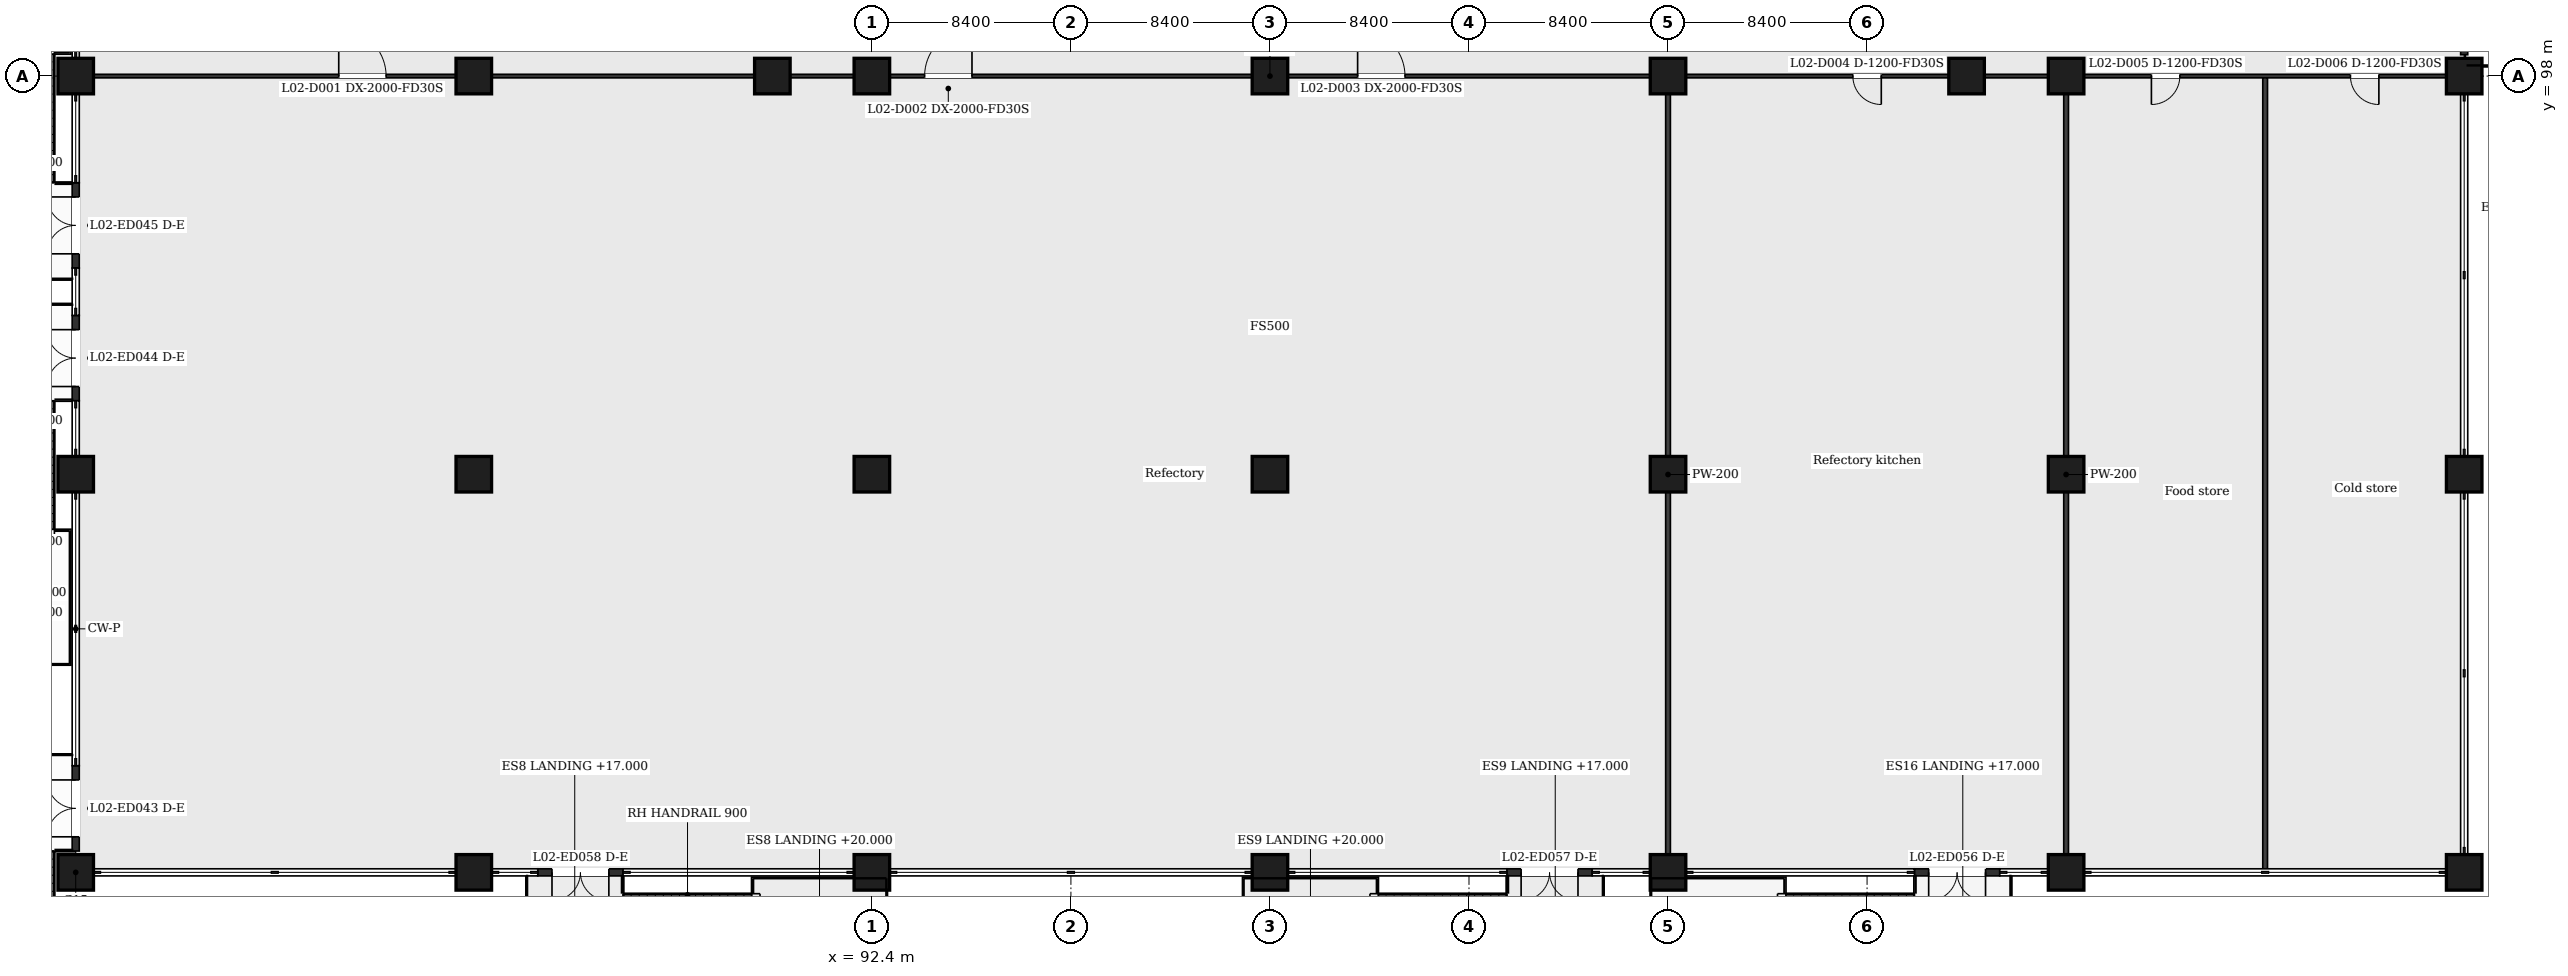
"""IFC4 building model, lengths in metres.
Left out: names, types, materials, properties, quantities, classifications, styles, units other than length and angle.
Written with IfcOpenShell. Run it as: python <this file> out.ifc"""

import sys

from ifc_helpers import new_model, si_unit, direction, frame, frame_2d, origin, origin_2d, place, context, subcontext, project, spatial, rectangle, extrude, element, fill, save


model = new_model("IFC4")
c1 = context("Model", 3, precision=1e-05, world=origin(), true_north=direction((0.0, 1.0)))
c2 = subcontext(c1, "Body", "Model", "MODEL_VIEW")
j1 = project(units=[si_unit("LENGTHUNIT", "METRE"), si_unit("PLANEANGLEUNIT", "RADIAN")], contexts=[c1])
p1 = place(None, origin())
s1 = spatial("IfcSite", under=j1, at=p1, CompositionType="ELEMENT")
p2 = place(p1, origin())
s2 = spatial("IfcBuilding", under=s1, at=p2, CompositionType="ELEMENT")
p3 = place(p2, frame((0.0, 0.0, 17.0)))
s3 = spatial("IfcBuildingStorey", under=s2, at=p3, CompositionType="ELEMENT", Elevation=17.0)
for number, where, z_axis, x_axis in (
    (1, (58.8, 64.4, 0.0), (0.0, 0.0, 1.0), (1.0, 0.0, 0.0)),
    (2, (75.6, 64.4, 0.0), (0.0, 0.0, 1.0), (1.0, 0.0, 0.0)),
    (3, (92.4, 64.4, 0.0), (0.0, 0.0, 1.0), (1.0, 0.0, 0.0)),
    (4, (109.2, 64.4, 0.0), (0.0, 0.0, 1.0), (1.0, 0.0, 0.0)),
    (5, (126.0, 64.4, 0.0), (0.0, 0.0, 1.0), (1.0, 0.0, 0.0)),
    (6, (142.8, 64.4, 0.0), (0.0, 0.0, 1.0), (1.0, 0.0, 0.0)),
    (7, (159.6, 64.4, 0.0), (0.0, 0.0, 1.0), (1.0, 0.0, 0.0)),
    (8, (58.8, 81.2, 0.0), (0.0, 0.0, 1.0), (1.0, 0.0, 0.0)),
    (9, (75.6, 81.2, 0.0), (0.0, 0.0, 1.0), (1.0, 0.0, 0.0)),
    (10, (92.4, 81.2, 0.0), (0.0, 0.0, 1.0), (1.0, 0.0, 0.0)),
    (11, (109.2, 81.2, 0.0), (0.0, 0.0, 1.0), (1.0, 0.0, 0.0)),
    (12, (126.0, 81.2, 0.0), (0.0, 0.0, 1.0), (1.0, 0.0, 0.0)),
    (13, (142.8, 81.2, 0.0), (0.0, 0.0, 1.0), (1.0, 0.0, 0.0)),
    (14, (159.6, 81.2, 0.0), (0.0, 0.0, 1.0), (1.0, 0.0, 0.0)),
    (15, (58.8, 98.0, 0.0), (0.0, 0.0, 1.0), (1.0, 0.0, 0.0)),
    (16, (75.6, 98.0, 0.0), (0.0, 0.0, 1.0), (1.0, 0.0, 0.0)),
    (17, (88.2, 98.0, 0.0), (0.0, 0.0, 1.0), (1.0, 0.0, 0.0)),
    (18, (92.4, 98.0, 0.0), (0.0, 0.0, 1.0), (1.0, 0.0, 0.0)),
    (19, (109.2, 98.0, 0.0), (0.0, 0.0, 1.0), (1.0, 0.0, 0.0)),
    (20, (126.0, 98.0, 0.0), (0.0, 0.0, 1.0), (1.0, 0.0, 0.0)),
    (21, (138.6, 98.0, 0.0), (0.0, 0.0, 1.0), (1.0, 0.0, 0.0)),
    (22, (142.8, 98.0, 0.0), (0.0, 0.0, 1.0), (1.0, 0.0, 0.0)),
    (23, (159.6, 98.0, 0.0), (0.0, 0.0, 1.0), (1.0, 0.0, 0.0)),
):
    element("IfcColumn", number, at=place(p3, frame(where, z_axis=z_axis, x_axis=x_axis)), inside=s3, PredefinedType="COLUMN", context=c2, shape_type="SweptSolid", body=[
        extrude(rectangle(XDim=1.5, YDim=1.5, at=origin_2d()), origin(), (0.0, 0.0, 1.0), 6.0),
    ])
p4 = place(p3, frame((58.8, 65.3, 0.0), z_axis=(0.0, 0.0, 1.0), x_axis=(0.0, 1.0, 0.0)))
e24 = element("IfcWall", 24, at=p4, inside=s3, PredefinedType="SOLIDWALL", context=c2, shape_type="SweptSolid", body=[
    extrude(rectangle(XDim=3.6, YDim=0.3, at=frame_2d((1.8, 0.0))), origin(), (0.0, 0.0, 1.0), 5.1),
])
p5 = place(p4, frame((0.6, 0.0, 0.0)))
e25 = element("IfcOpeningElement", 25, at=p5, cuts=e24, PredefinedType="OPENING", context=c2, shape_type="SweptSolid", body=[
    extrude(rectangle(XDim=2.4, YDim=2.4, at=frame_2d((1.2, 1.2))), frame((0.0, 0.16, 0.0), z_axis=(0.0, -1.0, 0.0), x_axis=(1.0, 0.0, 0.0)), (0.0, 0.0, 1.0), 0.32),
])
p6 = place(p3, frame((58.8, 84.3, 0.0), z_axis=(0.0, 0.0, 1.0), x_axis=(0.0, 1.0, 0.0)))
e26 = element("IfcWall", 26, at=p6, inside=s3, PredefinedType="SOLIDWALL", context=c2, shape_type="SweptSolid", body=[
    extrude(rectangle(XDim=3.6, YDim=0.3, at=frame_2d((1.8, 0.0))), origin(), (0.0, 0.0, 1.0), 5.1),
])
p7 = place(p6, frame((0.6, 0.0, 0.0)))
e27 = element("IfcOpeningElement", 27, at=p7, cuts=e26, PredefinedType="OPENING", context=c2, shape_type="SweptSolid", body=[
    extrude(rectangle(XDim=2.4, YDim=2.4, at=frame_2d((1.2, 1.2))), frame((0.0, 0.16, 0.0), z_axis=(0.0, -1.0, 0.0), x_axis=(1.0, 0.0, 0.0)), (0.0, 0.0, 1.0), 0.32),
])
p8 = place(p3, frame((58.8, 89.9, 0.0), z_axis=(0.0, 0.0, 1.0), x_axis=(0.0, 1.0, 0.0)))
e28 = element("IfcWall", 28, at=p8, inside=s3, PredefinedType="SOLIDWALL", context=c2, shape_type="SweptSolid", body=[
    extrude(rectangle(XDim=3.6, YDim=0.3, at=frame_2d((1.8, 0.0))), origin(), (0.0, 0.0, 1.0), 5.1),
])
p9 = place(p8, frame((0.6, 0.0, 0.0)))
e29 = element("IfcOpeningElement", 29, at=p9, cuts=e28, PredefinedType="OPENING", context=c2, shape_type="SweptSolid", body=[
    extrude(rectangle(XDim=2.4, YDim=2.4, at=frame_2d((1.2, 1.2))), frame((0.0, 0.16, 0.0), z_axis=(0.0, -1.0, 0.0), x_axis=(1.0, 0.0, 0.0)), (0.0, 0.0, 1.0), 0.32),
])
p10 = place(p3, frame((159.6, 102.5, 0.0), z_axis=(0.0, 0.0, 1.0), x_axis=(0.0, -1.0, 0.0)))
e30 = element("IfcWall", 30, at=p10, inside=s3, PredefinedType="SOLIDWALL", context=c2, shape_type="SweptSolid", body=[
    extrude(rectangle(XDim=3.6, YDim=0.3, at=frame_2d((1.8, 0.0))), origin(), (0.0, 0.0, 1.0), 5.1),
])
p11 = place(p10, frame((0.6, 0.0, 0.0)))
e31 = element("IfcOpeningElement", 31, at=p11, cuts=e30, PredefinedType="OPENING", context=c2, shape_type="SweptSolid", body=[
    extrude(rectangle(XDim=2.4, YDim=2.4, at=frame_2d((1.2, 1.2))), frame((0.0, 0.16, 0.0), z_axis=(0.0, -1.0, 0.0), x_axis=(1.0, 0.0, 0.0)), (0.0, 0.0, 1.0), 0.32),
])
p12 = place(p3, frame((140.0, 64.4, 0.0), z_axis=(0.0, 0.0, 1.0), x_axis=(-1.0, 0.0, 0.0)))
e32 = element("IfcWall", 32, at=p12, inside=s3, PredefinedType="SOLIDWALL", context=c2, shape_type="SweptSolid", body=[
    extrude(rectangle(XDim=3.6, YDim=0.3, at=frame_2d((1.8, 0.0))), origin(), (0.0, 0.0, 1.0), 5.1),
])
p13 = place(p12, frame((0.6, 0.0, 0.0)))
e33 = element("IfcOpeningElement", 33, at=p13, cuts=e32, PredefinedType="OPENING", context=c2, shape_type="SweptSolid", body=[
    extrude(rectangle(XDim=2.4, YDim=2.4, at=frame_2d((1.2, 1.2))), frame((0.0, 0.16, 0.0), z_axis=(0.0, -1.0, 0.0), x_axis=(1.0, 0.0, 0.0)), (0.0, 0.0, 1.0), 0.32),
])
p14 = place(p3, frame((122.8, 64.4, 0.0), z_axis=(0.0, 0.0, 1.0), x_axis=(-1.0, 0.0, 0.0)))
e34 = element("IfcWall", 34, at=p14, inside=s3, PredefinedType="SOLIDWALL", context=c2, shape_type="SweptSolid", body=[
    extrude(rectangle(XDim=3.6, YDim=0.3, at=frame_2d((1.8, 0.0))), origin(), (0.0, 0.0, 1.0), 5.1),
])
p15 = place(p14, frame((0.6, 0.0, 0.0)))
e35 = element("IfcOpeningElement", 35, at=p15, cuts=e34, PredefinedType="OPENING", context=c2, shape_type="SweptSolid", body=[
    extrude(rectangle(XDim=2.4, YDim=2.4, at=frame_2d((1.2, 1.2))), frame((0.0, 0.16, 0.0), z_axis=(0.0, -1.0, 0.0), x_axis=(1.0, 0.0, 0.0)), (0.0, 0.0, 1.0), 0.32),
])
p16 = place(p3, frame((81.9, 64.4, 0.0), z_axis=(0.0, 0.0, 1.0), x_axis=(-1.0, 0.0, 0.0)))
e36 = element("IfcWall", 36, at=p16, inside=s3, PredefinedType="SOLIDWALL", context=c2, shape_type="SweptSolid", body=[
    extrude(rectangle(XDim=3.6, YDim=0.3, at=frame_2d((1.8, 0.0))), origin(), (0.0, 0.0, 1.0), 5.1),
])
p17 = place(p16, frame((0.6, 0.0, 0.0)))
e37 = element("IfcOpeningElement", 37, at=p17, cuts=e36, PredefinedType="OPENING", context=c2, shape_type="SweptSolid", body=[
    extrude(rectangle(XDim=2.4, YDim=2.4, at=frame_2d((1.2, 1.2))), frame((0.0, 0.16, 0.0), z_axis=(0.0, -1.0, 0.0), x_axis=(1.0, 0.0, 0.0)), (0.0, 0.0, 1.0), 0.32),
])
p18 = place(p3, frame((58.85, 98.0, 0.0), z_axis=(0.0, 0.0, 1.0), x_axis=(1.0, 0.0, 0.0)))
e38 = element("IfcWall", 38, at=p18, inside=s3, PredefinedType="PARTITIONING", context=c2, shape_type="SweptSolid", body=[
    extrude(rectangle(XDim=100.7, YDim=0.15, at=frame_2d((50.35, 0.0))), origin(), (0.0, 0.0, 1.0), 5.5),
])
p19 = place(p18, frame((11.05, 0.0, 0.0)))
e39 = element("IfcOpeningElement", 39, at=p19, cuts=e38, PredefinedType="OPENING", context=c2, shape_type="SweptSolid", body=[
    extrude(rectangle(XDim=2.0, YDim=2.1, at=frame_2d((1.0, 1.05))), frame((0.0, 0.085, 0.0), z_axis=(0.0, -1.0, 0.0), x_axis=(1.0, 0.0, 0.0)), (0.0, 0.0, 1.0), 0.17),
])
p20 = place(p18, frame((35.775, 0.0, 0.0)))
e40 = element("IfcOpeningElement", 40, at=p20, cuts=e38, PredefinedType="OPENING", context=c2, shape_type="SweptSolid", body=[
    extrude(rectangle(XDim=2.0, YDim=2.1, at=frame_2d((1.0, 1.05))), frame((0.0, 0.085, 0.0), z_axis=(0.0, -1.0, 0.0), x_axis=(1.0, 0.0, 0.0)), (0.0, 0.0, 1.0), 0.17),
])
p21 = place(p18, frame((54.05, 0.0, 0.0)))
e41 = element("IfcOpeningElement", 41, at=p21, cuts=e38, PredefinedType="OPENING", context=c2, shape_type="SweptSolid", body=[
    extrude(rectangle(XDim=2.0, YDim=2.1, at=frame_2d((1.0, 1.05))), frame((0.0, 0.085, 0.0), z_axis=(0.0, -1.0, 0.0), x_axis=(1.0, 0.0, 0.0)), (0.0, 0.0, 1.0), 0.17),
])
p22 = place(p18, frame((74.95, 0.0, 0.0)))
e42 = element("IfcOpeningElement", 42, at=p22, cuts=e38, PredefinedType="OPENING", context=c2, shape_type="SweptSolid", body=[
    extrude(rectangle(XDim=1.2, YDim=2.1, at=frame_2d((0.6, 1.05))), frame((0.0, 0.085, 0.0), z_axis=(0.0, -1.0, 0.0), x_axis=(1.0, 0.0, 0.0)), (0.0, 0.0, 1.0), 0.17),
])
p23 = place(p18, frame((87.55, 0.0, 0.0)))
e43 = element("IfcOpeningElement", 43, at=p23, cuts=e38, PredefinedType="OPENING", context=c2, shape_type="SweptSolid", body=[
    extrude(rectangle(XDim=1.2, YDim=2.1, at=frame_2d((0.6, 1.05))), frame((0.0, 0.085, 0.0), z_axis=(0.0, -1.0, 0.0), x_axis=(1.0, 0.0, 0.0)), (0.0, 0.0, 1.0), 0.17),
])
p24 = place(p18, frame((95.95, 0.0, 0.0)))
e44 = element("IfcOpeningElement", 44, at=p24, cuts=e38, PredefinedType="OPENING", context=c2, shape_type="SweptSolid", body=[
    extrude(rectangle(XDim=1.2, YDim=2.1, at=frame_2d((0.6, 1.05))), frame((0.0, 0.085, 0.0), z_axis=(0.0, -1.0, 0.0), x_axis=(1.0, 0.0, 0.0)), (0.0, 0.0, 1.0), 0.17),
])
for number, where, z_axis, x_axis in (
    (45, (126.0, 64.45, 0.0), (0.0, 0.0, 1.0), (0.0, 1.0, 0.0)),
    (46, (142.8, 64.45, 0.0), (0.0, 0.0, 1.0), (0.0, 1.0, 0.0)),
    (47, (151.2, 64.45, 0.0), (0.0, 0.0, 1.0), (0.0, 1.0, 0.0)),
):
    element("IfcWall", number, at=place(p3, frame(where, z_axis=z_axis, x_axis=x_axis)), inside=s3, PredefinedType="PARTITIONING", context=c2, shape_type="SweptSolid", body=[
        extrude(rectangle(XDim=33.475, YDim=0.2, at=frame_2d((16.738, 0.0))), origin(), (0.0, 0.0, 1.0), 5.5),
    ])
p25 = place(p5, origin())
e48 = element("IfcDoor", 48, at=p25, inside=s3, OperationType="DOUBLE_DOOR_DOUBLE_SWING", PredefinedType="DOOR", context=c2, shape_type="SweptSolid", body=[
    extrude(rectangle(XDim=2.4, YDim=2.4, at=frame_2d((1.2, 1.2))), frame((0.0, 0.025, 0.0), z_axis=(0.0, -1.0, 0.0), x_axis=(1.0, 0.0, 0.0)), (0.0, 0.0, 1.0), 0.05),
])
fill(e25, e48)
p26 = place(p7, origin())
e49 = element("IfcDoor", 49, at=p26, inside=s3, OperationType="DOUBLE_DOOR_DOUBLE_SWING", PredefinedType="DOOR", context=c2, shape_type="SweptSolid", body=[
    extrude(rectangle(XDim=2.4, YDim=2.4, at=frame_2d((1.2, 1.2))), frame((0.0, 0.025, 0.0), z_axis=(0.0, -1.0, 0.0), x_axis=(1.0, 0.0, 0.0)), (0.0, 0.0, 1.0), 0.05),
])
fill(e27, e49)
p27 = place(p9, origin())
e50 = element("IfcDoor", 50, at=p27, inside=s3, OperationType="DOUBLE_DOOR_DOUBLE_SWING", PredefinedType="DOOR", context=c2, shape_type="SweptSolid", body=[
    extrude(rectangle(XDim=2.4, YDim=2.4, at=frame_2d((1.2, 1.2))), frame((0.0, 0.025, 0.0), z_axis=(0.0, -1.0, 0.0), x_axis=(1.0, 0.0, 0.0)), (0.0, 0.0, 1.0), 0.05),
])
fill(e29, e50)
p28 = place(p13, origin())
e51 = element("IfcDoor", 51, at=p28, inside=s3, OperationType="DOUBLE_DOOR_DOUBLE_SWING", PredefinedType="DOOR", context=c2, shape_type="SweptSolid", body=[
    extrude(rectangle(XDim=2.4, YDim=2.4, at=frame_2d((1.2, 1.2))), frame((0.0, 0.025, 0.0), z_axis=(0.0, -1.0, 0.0), x_axis=(1.0, 0.0, 0.0)), (0.0, 0.0, 1.0), 0.05),
])
fill(e33, e51)
p29 = place(p15, origin())
e52 = element("IfcDoor", 52, at=p29, inside=s3, OperationType="DOUBLE_DOOR_DOUBLE_SWING", PredefinedType="DOOR", context=c2, shape_type="SweptSolid", body=[
    extrude(rectangle(XDim=2.4, YDim=2.4, at=frame_2d((1.2, 1.2))), frame((0.0, 0.025, 0.0), z_axis=(0.0, -1.0, 0.0), x_axis=(1.0, 0.0, 0.0)), (0.0, 0.0, 1.0), 0.05),
])
fill(e35, e52)
p30 = place(p17, origin())
e53 = element("IfcDoor", 53, at=p30, inside=s3, OperationType="DOUBLE_DOOR_DOUBLE_SWING", PredefinedType="DOOR", context=c2, shape_type="SweptSolid", body=[
    extrude(rectangle(XDim=2.4, YDim=2.4, at=frame_2d((1.2, 1.2))), frame((0.0, 0.025, 0.0), z_axis=(0.0, -1.0, 0.0), x_axis=(1.0, 0.0, 0.0)), (0.0, 0.0, 1.0), 0.05),
])
fill(e37, e53)
p31 = place(p19, origin())
e54 = element("IfcDoor", 54, at=p31, inside=s3, OperationType="SINGLE_SWING_LEFT", PredefinedType="DOOR", context=c2, shape_type="SweptSolid", body=[
    extrude(rectangle(XDim=2.0, YDim=2.1, at=frame_2d((1.0, 1.05))), frame((0.0, 0.025, 0.0), z_axis=(0.0, -1.0, 0.0), x_axis=(1.0, 0.0, 0.0)), (0.0, 0.0, 1.0), 0.05),
])
fill(e39, e54)
p32 = place(p20, origin())
e55 = element("IfcDoor", 55, at=p32, inside=s3, OperationType="SINGLE_SWING_RIGHT", PredefinedType="DOOR", context=c2, shape_type="SweptSolid", body=[
    extrude(rectangle(XDim=2.0, YDim=2.1, at=frame_2d((1.0, 1.05))), frame((0.0, 0.025, 0.0), z_axis=(0.0, -1.0, 0.0), x_axis=(1.0, 0.0, 0.0)), (0.0, 0.0, 1.0), 0.05),
])
fill(e40, e55)
p33 = place(p21, origin())
e56 = element("IfcDoor", 56, at=p33, inside=s3, OperationType="SINGLE_SWING_LEFT", PredefinedType="DOOR", context=c2, shape_type="SweptSolid", body=[
    extrude(rectangle(XDim=2.0, YDim=2.1, at=frame_2d((1.0, 1.05))), frame((0.0, 0.025, 0.0), z_axis=(0.0, -1.0, 0.0), x_axis=(1.0, 0.0, 0.0)), (0.0, 0.0, 1.0), 0.05),
])
fill(e41, e56)
p34 = place(p22, origin())
e57 = element("IfcDoor", 57, at=p34, inside=s3, OperationType="SINGLE_SWING_RIGHT", PredefinedType="DOOR", context=c2, shape_type="SweptSolid", body=[
    extrude(rectangle(XDim=1.2, YDim=2.1, at=frame_2d((0.6, 1.05))), frame((0.0, 0.025, 0.0), z_axis=(0.0, -1.0, 0.0), x_axis=(1.0, 0.0, 0.0)), (0.0, 0.0, 1.0), 0.05),
])
fill(e42, e57)
p35 = place(p23, origin())
e58 = element("IfcDoor", 58, at=p35, inside=s3, OperationType="SINGLE_SWING_LEFT", PredefinedType="DOOR", context=c2, shape_type="SweptSolid", body=[
    extrude(rectangle(XDim=1.2, YDim=2.1, at=frame_2d((0.6, 1.05))), frame((0.0, 0.025, 0.0), z_axis=(0.0, -1.0, 0.0), x_axis=(1.0, 0.0, 0.0)), (0.0, 0.0, 1.0), 0.05),
])
fill(e43, e58)
p36 = place(p24, origin())
e59 = element("IfcDoor", 59, at=p36, inside=s3, OperationType="SINGLE_SWING_RIGHT", PredefinedType="DOOR", context=c2, shape_type="SweptSolid", body=[
    extrude(rectangle(XDim=1.2, YDim=2.1, at=frame_2d((0.6, 1.05))), frame((0.0, 0.025, 0.0), z_axis=(0.0, -1.0, 0.0), x_axis=(1.0, 0.0, 0.0)), (0.0, 0.0, 1.0), 0.05),
])
fill(e44, e59)
save(model, sys.argv[1])
